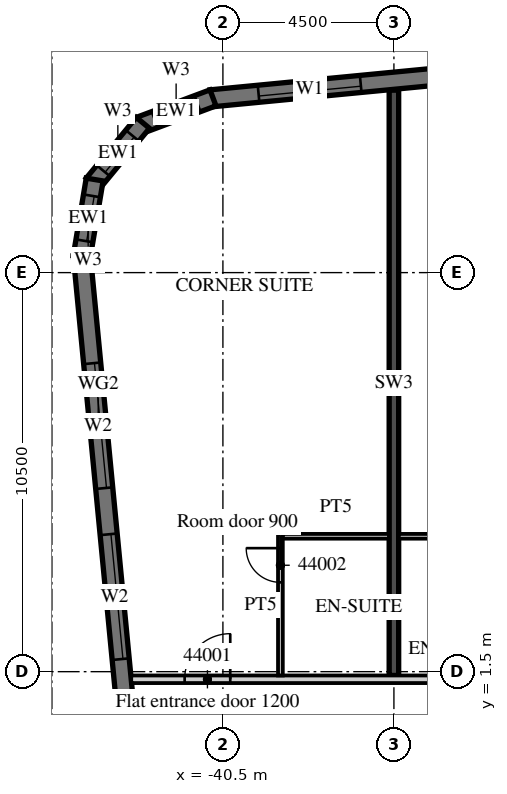
"""IFC4 building model, lengths in metres.
Left out: names, types, materials, properties, quantities, classifications, styles, units other than length and angle.
Written with IfcOpenShell. Run it as: python <this file> out.ifc"""

import sys

from ifc_helpers import new_model, si_unit, direction, frame, frame_2d, origin, place, context, subcontext, project, spatial, polyline, rectangle, outline, extrude, element, fill, save


model = new_model("IFC4")
c1 = context("Model", 3, precision=1e-05, world=origin(), true_north=direction((0.0, 1.0)))
c2 = subcontext(c1, "Body", "Model", "MODEL_VIEW")
j1 = project(units=[si_unit("LENGTHUNIT", "METRE"), si_unit("PLANEANGLEUNIT", "RADIAN")], contexts=[c1])
p1 = place(None, origin())
s1 = spatial("IfcSite", under=j1, at=p1, CompositionType="ELEMENT")
p2 = place(p1, origin())
s2 = spatial("IfcBuilding", under=s1, at=p2, CompositionType="ELEMENT")
p3 = place(p2, frame((0.0, 0.0, 186.7)))
s3 = spatial("IfcBuildingStorey", under=s2, at=p3, CompositionType="ELEMENT", Elevation=186.7)
p4 = place(p3, frame((-36.0, 1.4, 0.0), z_axis=(0.0, 0.0, 1.0), x_axis=(0.0, 1.0, 0.0)))
e1 = element("IfcWall", 1, at=p4, inside=s3, PredefinedType="SHEAR", context=c2, shape_type="SweptSolid", body=[
    extrude(rectangle(XDim=15.401, YDim=0.25, at=frame_2d((7.701, 0.0))), origin(), (0.0, 0.0, 1.0), 3.3),
])
p5 = place(p3, frame((-44.214, 12.466, 0.0), z_axis=(0.0, 0.0, 1.0), x_axis=(0.095847314626, -0.995396047952, 0.0)))
e2 = element("IfcWall", 2, at=p5, inside=s3, PredefinedType="SOLIDWALL", context=c2, shape_type="SweptSolid", body=[
    extrude(rectangle(XDim=34.0, YDim=0.45, at=frame_2d((17.0, 0.0))), origin(), (0.0, 0.0, 1.0), 3.02),
])
p6 = place(p5, frame((2.865, 0.0, 0.45)))
e3 = element("IfcOpeningElement", 3, at=p6, cuts=e2, PredefinedType="OPENING", context=c2, shape_type="SweptSolid", body=[
    extrude(rectangle(XDim=3.3, YDim=2.25, at=frame_2d((1.65, 1.125))), frame((0.0, 0.235, 0.0), z_axis=(0.0, -1.0, 0.0), x_axis=(1.0, 0.0, 0.0)), (0.0, 0.0, 1.0), 0.47),
])
p7 = place(p5, frame((7.386, 0.0, 0.45)))
e4 = element("IfcOpeningElement", 4, at=p7, cuts=e2, PredefinedType="OPENING", context=c2, shape_type="SweptSolid", body=[
    extrude(rectangle(XDim=3.3, YDim=2.25, at=frame_2d((1.65, 1.125))), frame((0.0, 0.235, 0.0), z_axis=(0.0, -1.0, 0.0), x_axis=(1.0, 0.0, 0.0)), (0.0, 0.0, 1.0), 0.47),
])
p8 = place(p3, frame((13.521, 21.817, 0.0), z_axis=(0.0, 0.0, 1.0), x_axis=(-0.995396508751, -0.095842529008, 0.0)))
e5 = element("IfcWall", 5, at=p8, inside=s3, PredefinedType="SOLIDWALL", context=c2, shape_type="SweptSolid", body=[
    extrude(rectangle(XDim=54.591, YDim=0.45, at=frame_2d((27.296, 0.0))), origin(), (0.0, 0.0, 1.0), 3.02),
])
p9 = place(p8, frame((0.91, 0.0, 0.45)))
e6 = element("IfcOpeningElement", 6, at=p9, cuts=e5, PredefinedType="OPENING", context=c2, shape_type="SweptSolid", body=[
    extrude(rectangle(XDim=2.7, YDim=2.25, at=frame_2d((1.35, 1.125))), frame((0.0, 0.235, 0.0), z_axis=(0.0, -1.0, 0.0), x_axis=(1.0, 0.0, 0.0)), (0.0, 0.0, 1.0), 0.47),
])
p10 = place(p8, frame((5.431, 0.0, 0.45)))
e7 = element("IfcOpeningElement", 7, at=p10, cuts=e5, PredefinedType="OPENING", context=c2, shape_type="SweptSolid", body=[
    extrude(rectangle(XDim=2.7, YDim=2.25, at=frame_2d((1.35, 1.125))), frame((0.0, 0.235, 0.0), z_axis=(0.0, -1.0, 0.0), x_axis=(1.0, 0.0, 0.0)), (0.0, 0.0, 1.0), 0.47),
])
p11 = place(p8, frame((9.952, 0.0, 0.45)))
e8 = element("IfcOpeningElement", 8, at=p11, cuts=e5, PredefinedType="OPENING", context=c2, shape_type="SweptSolid", body=[
    extrude(rectangle(XDim=2.7, YDim=2.25, at=frame_2d((1.35, 1.125))), frame((0.0, 0.235, 0.0), z_axis=(0.0, -1.0, 0.0), x_axis=(1.0, 0.0, 0.0)), (0.0, 0.0, 1.0), 0.47),
])
p12 = place(p8, frame((14.473, 0.0, 0.45)))
e9 = element("IfcOpeningElement", 9, at=p12, cuts=e5, PredefinedType="OPENING", context=c2, shape_type="SweptSolid", body=[
    extrude(rectangle(XDim=2.7, YDim=2.25, at=frame_2d((1.35, 1.125))), frame((0.0, 0.235, 0.0), z_axis=(0.0, -1.0, 0.0), x_axis=(1.0, 0.0, 0.0)), (0.0, 0.0, 1.0), 0.47),
])
p13 = place(p8, frame((18.994, 0.0, 0.45)))
e10 = element("IfcOpeningElement", 10, at=p13, cuts=e5, PredefinedType="OPENING", context=c2, shape_type="SweptSolid", body=[
    extrude(rectangle(XDim=2.7, YDim=2.25, at=frame_2d((1.35, 1.125))), frame((0.0, 0.235, 0.0), z_axis=(0.0, -1.0, 0.0), x_axis=(1.0, 0.0, 0.0)), (0.0, 0.0, 1.0), 0.47),
])
p14 = place(p8, frame((23.514, 0.0, 0.45)))
e11 = element("IfcOpeningElement", 11, at=p14, cuts=e5, PredefinedType="OPENING", context=c2, shape_type="SweptSolid", body=[
    extrude(rectangle(XDim=2.7, YDim=2.25, at=frame_2d((1.35, 1.125))), frame((0.0, 0.235, 0.0), z_axis=(0.0, -1.0, 0.0), x_axis=(1.0, 0.0, 0.0)), (0.0, 0.0, 1.0), 0.47),
])
p15 = place(p8, frame((28.035, 0.0, 0.45)))
e12 = element("IfcOpeningElement", 12, at=p15, cuts=e5, PredefinedType="OPENING", context=c2, shape_type="SweptSolid", body=[
    extrude(rectangle(XDim=2.7, YDim=2.25, at=frame_2d((1.35, 1.125))), frame((0.0, 0.235, 0.0), z_axis=(0.0, -1.0, 0.0), x_axis=(1.0, 0.0, 0.0)), (0.0, 0.0, 1.0), 0.47),
])
p16 = place(p8, frame((32.556, 0.0, 0.45)))
e13 = element("IfcOpeningElement", 13, at=p16, cuts=e5, PredefinedType="OPENING", context=c2, shape_type="SweptSolid", body=[
    extrude(rectangle(XDim=2.7, YDim=2.25, at=frame_2d((1.35, 1.125))), frame((0.0, 0.235, 0.0), z_axis=(0.0, -1.0, 0.0), x_axis=(1.0, 0.0, 0.0)), (0.0, 0.0, 1.0), 0.47),
])
p17 = place(p8, frame((37.077, 0.0, 0.45)))
e14 = element("IfcOpeningElement", 14, at=p17, cuts=e5, PredefinedType="OPENING", context=c2, shape_type="SweptSolid", body=[
    extrude(rectangle(XDim=2.7, YDim=2.25, at=frame_2d((1.35, 1.125))), frame((0.0, 0.235, 0.0), z_axis=(0.0, -1.0, 0.0), x_axis=(1.0, 0.0, 0.0)), (0.0, 0.0, 1.0), 0.47),
])
p18 = place(p8, frame((41.598, 0.0, 0.45)))
e15 = element("IfcOpeningElement", 15, at=p18, cuts=e5, PredefinedType="OPENING", context=c2, shape_type="SweptSolid", body=[
    extrude(rectangle(XDim=2.7, YDim=2.25, at=frame_2d((1.35, 1.125))), frame((0.0, 0.235, 0.0), z_axis=(0.0, -1.0, 0.0), x_axis=(1.0, 0.0, 0.0)), (0.0, 0.0, 1.0), 0.47),
])
p19 = place(p8, frame((46.118, 0.0, 0.45)))
e16 = element("IfcOpeningElement", 16, at=p19, cuts=e5, PredefinedType="OPENING", context=c2, shape_type="SweptSolid", body=[
    extrude(rectangle(XDim=2.7, YDim=2.25, at=frame_2d((1.35, 1.125))), frame((0.0, 0.235, 0.0), z_axis=(0.0, -1.0, 0.0), x_axis=(1.0, 0.0, 0.0)), (0.0, 0.0, 1.0), 0.47),
])
p20 = place(p8, frame((50.629, 0.0, 0.45)))
e17 = element("IfcOpeningElement", 17, at=p20, cuts=e5, PredefinedType="OPENING", context=c2, shape_type="SweptSolid", body=[
    extrude(rectangle(XDim=2.7, YDim=2.25, at=frame_2d((1.35, 1.125))), frame((0.0, 0.235, 0.0), z_axis=(0.0, -1.0, 0.0), x_axis=(1.0, 0.0, 0.0)), (0.0, 0.0, 1.0), 0.47),
])
p21 = place(p3, frame((-40.761, 16.598, 0.0), z_axis=(0.0, 0.0, 1.0), x_axis=(-0.936677599948, -0.350192909346, 0.0)))
e18 = element("IfcWall", 18, at=p21, inside=s3, PredefinedType="SOLIDWALL", context=c2, shape_type="SweptSolid", body=[
    extrude(outline(polyline([(0.0, -0.225), (2.071, -0.225), (1.95, 0.225), (0.121, 0.225), (0.0, -0.225)])), origin(), (0.0, 0.0, 1.0), 3.02),
])
p22 = place(p21, frame((0.435, 0.0, 0.45)))
e19 = element("IfcOpeningElement", 19, at=p22, cuts=e18, PredefinedType="OPENING", context=c2, shape_type="SweptSolid", body=[
    extrude(rectangle(XDim=1.2, YDim=2.25, at=frame_2d((0.6, 1.125))), frame((0.0, 0.235, 0.0), z_axis=(0.0, -1.0, 0.0), x_axis=(1.0, 0.0, 0.0)), (0.0, 0.0, 1.0), 0.47),
])
p23 = place(p3, frame((-42.606, 15.941, 0.0), z_axis=(0.0, 0.0, 1.0), x_axis=(-0.636116318187, -0.771593176315, 0.0)))
e20 = element("IfcWall", 20, at=p23, inside=s3, PredefinedType="SOLIDWALL", context=c2, shape_type="SweptSolid", body=[
    extrude(outline(polyline([(0.0, -0.225), (2.071, -0.225), (1.95, 0.225), (0.121, 0.225), (0.0, -0.225)])), origin(), (0.0, 0.0, 1.0), 3.02),
])
p24 = place(p23, frame((0.435, 0.0, 0.45)))
e21 = element("IfcOpeningElement", 21, at=p24, cuts=e20, PredefinedType="OPENING", context=c2, shape_type="SweptSolid", body=[
    extrude(rectangle(XDim=1.2, YDim=2.25, at=frame_2d((0.6, 1.125))), frame((0.0, 0.235, 0.0), z_axis=(0.0, -1.0, 0.0), x_axis=(1.0, 0.0, 0.0)), (0.0, 0.0, 1.0), 0.47),
])
p25 = place(p3, frame((-43.875, 14.449, 0.0), z_axis=(0.0, 0.0, 1.0), x_axis=(-0.164953448126, -0.986301353518, 0.0)))
e22 = element("IfcWall", 22, at=p25, inside=s3, PredefinedType="SOLIDWALL", context=c2, shape_type="SweptSolid", body=[
    extrude(outline(polyline([(0.0, -0.225), (2.071, -0.225), (1.95, 0.225), (0.121, 0.225), (0.0, -0.225)])), origin(), (0.0, 0.0, 1.0), 3.02),
])
p26 = place(p25, frame((0.435, 0.0, 0.45)))
e23 = element("IfcOpeningElement", 23, at=p26, cuts=e22, PredefinedType="OPENING", context=c2, shape_type="SweptSolid", body=[
    extrude(rectangle(XDim=1.2, YDim=2.25, at=frame_2d((0.6, 1.125))), frame((0.0, 0.235, 0.0), z_axis=(0.0, -1.0, 0.0), x_axis=(1.0, 0.0, 0.0)), (0.0, 0.0, 1.0), 0.47),
])
p27 = place(p3, frame((-42.913, 1.3, 0.0), z_axis=(0.0, 0.0, 1.0), x_axis=(1.0, 0.0, 0.0)))
e24 = element("IfcWall", 24, at=p27, inside=s3, PredefinedType="PARTITIONING", context=c2, shape_type="SweptSolid", body=[
    extrude(rectangle(XDim=29.413, YDim=0.2, at=frame_2d((14.707, 0.0))), origin(), (0.0, 0.0, 1.0), 3.02),
])
p28 = place(p27, frame((1.406, 0.0, 0.0)))
e25 = element("IfcOpeningElement", 25, at=p28, cuts=e24, PredefinedType="OPENING", context=c2, shape_type="SweptSolid", body=[
    extrude(rectangle(XDim=1.2, YDim=2.1, at=frame_2d((0.6, 1.05))), frame((0.0, 0.11, 0.0), z_axis=(0.0, -1.0, 0.0), x_axis=(1.0, 0.0, 0.0)), (0.0, 0.0, 1.0), 0.22),
])
p29 = place(p27, frame((12.275, 0.0, 0.0)))
e26 = element("IfcOpeningElement", 26, at=p29, cuts=e24, PredefinedType="OPENING", context=c2, shape_type="SweptSolid", body=[
    extrude(rectangle(XDim=1.2, YDim=2.1, at=frame_2d((0.6, 1.05))), frame((0.0, 0.11, 0.0), z_axis=(0.0, -1.0, 0.0), x_axis=(1.0, 0.0, 0.0)), (0.0, 0.0, 1.0), 0.22),
])
p30 = place(p27, frame((18.35, 0.0, 0.0)))
e27 = element("IfcOpeningElement", 27, at=p30, cuts=e24, PredefinedType="OPENING", context=c2, shape_type="SweptSolid", body=[
    extrude(rectangle(XDim=1.2, YDim=2.1, at=frame_2d((0.6, 1.05))), frame((0.0, 0.11, 0.0), z_axis=(0.0, -1.0, 0.0), x_axis=(1.0, 0.0, 0.0)), (0.0, 0.0, 1.0), 0.22),
])
p31 = place(p27, frame((25.488, 0.0, 0.0)))
e28 = element("IfcOpeningElement", 28, at=p31, cuts=e24, PredefinedType="OPENING", context=c2, shape_type="SweptSolid", body=[
    extrude(rectangle(XDim=1.0, YDim=2.1, at=frame_2d((0.5, 1.05))), frame((0.0, 0.11, 0.0), z_axis=(0.0, -1.0, 0.0), x_axis=(1.0, 0.0, 0.0)), (0.0, 0.0, 1.0), 0.22),
])
p32 = place(p3, frame((-38.987, 1.4, 0.0), z_axis=(0.0, 0.0, 1.0), x_axis=(0.0, 1.0, 0.0)))
e29 = element("IfcWall", 29, at=p32, inside=s3, PredefinedType="PARTITIONING", context=c2, shape_type="SweptSolid", body=[
    extrude(rectangle(XDim=3.725, YDim=0.125, at=frame_2d((1.863, 0.0))), origin(), (0.0, 0.0, 1.0), 3.02),
])
p33 = place(p32, frame((2.45, 0.0, 0.0)))
e30 = element("IfcOpeningElement", 30, at=p33, cuts=e29, PredefinedType="OPENING", context=c2, shape_type="SweptSolid", body=[
    extrude(rectangle(XDim=0.9, YDim=2.1, at=frame_2d((0.45, 1.05))), frame((0.0, 0.073, 0.0), z_axis=(0.0, -1.0, 0.0), x_axis=(1.0, 0.0, 0.0)), (0.0, 0.0, 1.0), 0.145),
])
for number, where, z_axis, x_axis in (
    (31, (-38.925, 5.062, 0.0), (0.0, 0.0, 1.0), (1.0, 0.0, 0.0)),
    (32, (-35.875, 5.062, 0.0), (0.0, 0.0, 1.0), (1.0, 0.0, 0.0)),
):
    element("IfcWall", number, at=place(p3, frame(where, z_axis=z_axis, x_axis=x_axis)), inside=s3, PredefinedType="PARTITIONING", context=c2, shape_type="SweptSolid", body=[
        extrude(rectangle(XDim=2.8, YDim=0.125, at=frame_2d((1.4, 0.0))), origin(), (0.0, 0.0, 1.0), 3.02),
    ])
p34 = place(p6, origin())
e33 = element("IfcWindow", 33, at=p34, inside=s3, PartitioningType="SINGLE_PANEL", PredefinedType="WINDOW", context=c2, shape_type="SweptSolid", body=[
    extrude(rectangle(XDim=3.3, YDim=2.25, at=frame_2d((1.65, 1.125))), frame((0.0, 0.09, 0.0), z_axis=(0.0, -1.0, 0.0), x_axis=(1.0, 0.0, 0.0)), (0.0, 0.0, 1.0), 0.06),
])
fill(e3, e33)
p35 = place(p7, origin())
e34 = element("IfcWindow", 34, at=p35, inside=s3, PartitioningType="SINGLE_PANEL", PredefinedType="WINDOW", context=c2, shape_type="SweptSolid", body=[
    extrude(rectangle(XDim=3.3, YDim=2.25, at=frame_2d((1.65, 1.125))), frame((0.0, 0.09, 0.0), z_axis=(0.0, -1.0, 0.0), x_axis=(1.0, 0.0, 0.0)), (0.0, 0.0, 1.0), 0.06),
])
fill(e4, e34)
p36 = place(p20, origin())
e35 = element("IfcWindow", 35, at=p36, inside=s3, PartitioningType="SINGLE_PANEL", PredefinedType="WINDOW", context=c2, shape_type="SweptSolid", body=[
    extrude(rectangle(XDim=2.7, YDim=2.25, at=frame_2d((1.35, 1.125))), frame((0.0, 0.09, 0.0), z_axis=(0.0, -1.0, 0.0), x_axis=(1.0, 0.0, 0.0)), (0.0, 0.0, 1.0), 0.06),
])
fill(e17, e35)
p37 = place(p22, origin())
e36 = element("IfcWindow", 36, at=p37, inside=s3, PartitioningType="SINGLE_PANEL", PredefinedType="WINDOW", context=c2, shape_type="SweptSolid", body=[
    extrude(rectangle(XDim=1.2, YDim=2.25, at=frame_2d((0.6, 1.125))), frame((0.0, 0.09, 0.0), z_axis=(0.0, -1.0, 0.0), x_axis=(1.0, 0.0, 0.0)), (0.0, 0.0, 1.0), 0.06),
])
fill(e19, e36)
p38 = place(p24, origin())
e37 = element("IfcWindow", 37, at=p38, inside=s3, PartitioningType="SINGLE_PANEL", PredefinedType="WINDOW", context=c2, shape_type="SweptSolid", body=[
    extrude(rectangle(XDim=1.2, YDim=2.25, at=frame_2d((0.6, 1.125))), frame((0.0, 0.09, 0.0), z_axis=(0.0, -1.0, 0.0), x_axis=(1.0, 0.0, 0.0)), (0.0, 0.0, 1.0), 0.06),
])
fill(e21, e37)
p39 = place(p26, origin())
e38 = element("IfcWindow", 38, at=p39, inside=s3, PartitioningType="SINGLE_PANEL", PredefinedType="WINDOW", context=c2, shape_type="SweptSolid", body=[
    extrude(rectangle(XDim=1.2, YDim=2.25, at=frame_2d((0.6, 1.125))), frame((0.0, 0.09, 0.0), z_axis=(0.0, -1.0, 0.0), x_axis=(1.0, 0.0, 0.0)), (0.0, 0.0, 1.0), 0.06),
])
fill(e23, e38)
p40 = place(p28, origin())
e39 = element("IfcDoor", 39, at=p40, inside=s3, OperationType="SINGLE_SWING_RIGHT", PredefinedType="DOOR", context=c2, shape_type="SweptSolid", body=[
    extrude(rectangle(XDim=1.2, YDim=2.1, at=frame_2d((0.6, 1.05))), frame((0.0, 0.025, 0.0), z_axis=(0.0, -1.0, 0.0), x_axis=(1.0, 0.0, 0.0)), (0.0, 0.0, 1.0), 0.05),
])
fill(e25, e39)
p41 = place(p33, origin())
e40 = element("IfcDoor", 40, at=p41, inside=s3, OperationType="SINGLE_SWING_RIGHT", PredefinedType="DOOR", context=c2, shape_type="SweptSolid", body=[
    extrude(rectangle(XDim=0.9, YDim=2.1, at=frame_2d((0.45, 1.05))), frame((0.0, 0.025, 0.0), z_axis=(0.0, -1.0, 0.0), x_axis=(1.0, 0.0, 0.0)), (0.0, 0.0, 1.0), 0.05),
])
fill(e30, e40)
save(model, sys.argv[1])
